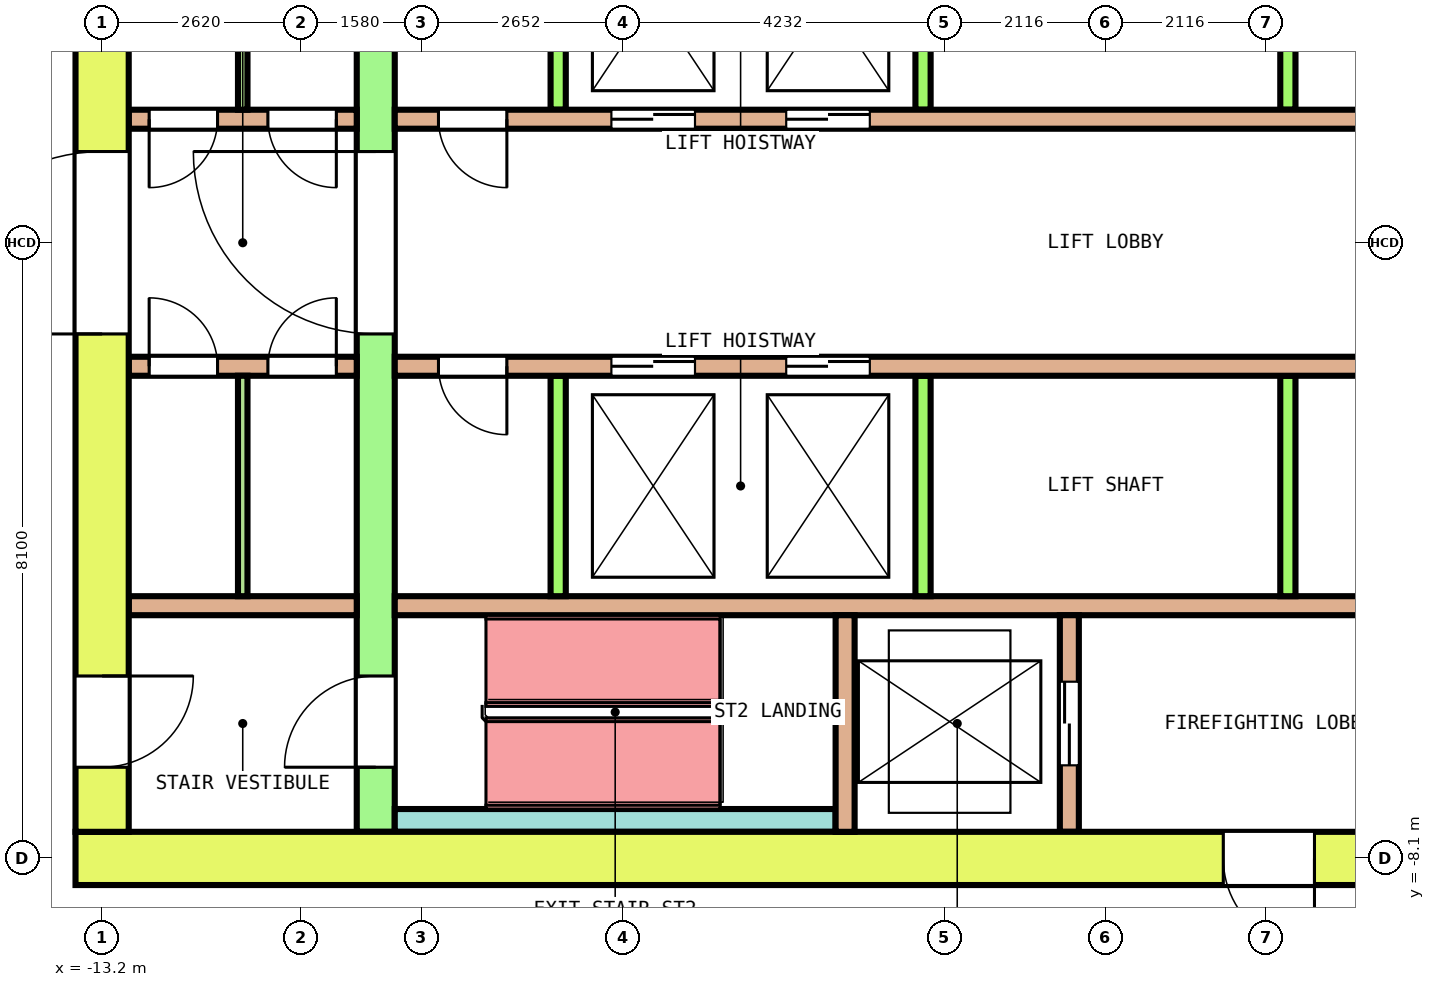
"""IFC4 building model, lengths in metres.
Left out: names, types, materials, properties, quantities, classifications, styles, units other than length and angle.
Written with IfcOpenShell. Run it as: python <this file> out.ifc"""

import sys

from ifc_helpers import new_model, si_unit, direction, frame, frame_2d, origin, place, context, subcontext, project, spatial, rectangle, extrude, element, fill, save


model = new_model("IFC4")
c1 = context("Model", 3, precision=1e-05, world=origin(), true_north=direction((0.0, 1.0)))
c2 = subcontext(c1, "Body", "Model", "MODEL_VIEW")
j1 = project(units=[si_unit("LENGTHUNIT", "METRE"), si_unit("PLANEANGLEUNIT", "RADIAN")], contexts=[c1])
p1 = place(None, origin())
s1 = spatial("IfcSite", under=j1, at=p1, CompositionType="ELEMENT")
p2 = place(p1, origin())
s2 = spatial("IfcBuilding", under=s1, at=p2, CompositionType="ELEMENT")
p3 = place(p2, frame((0.0, 0.0, 149.6)))
s3 = spatial("IfcBuildingStorey", under=s2, at=p3, CompositionType="ELEMENT", Elevation=149.6)
p4 = place(p3, frame((-13.55, -8.1, 0.0), z_axis=(0.0, 0.0, 1.0), x_axis=(1.0, 0.0, 0.0)))
e1 = element("IfcWall", 1, at=p4, inside=s3, PredefinedType="SHEAR", context=c2, shape_type="SweptSolid", body=[
    extrude(rectangle(XDim=27.1, YDim=0.7, at=frame_2d((13.55, 0.0))), origin(), (0.0, 0.0, 1.0), 4.1),
])
p5 = place(p4, frame((15.1, 0.0, 0.0)))
e2 = element("IfcOpeningElement", 2, at=p5, cuts=e1, PredefinedType="OPENING", context=c2, shape_type="SweptSolid", body=[
    extrude(rectangle(XDim=1.2, YDim=2.1, at=frame_2d((0.6, 1.05))), frame((0.0, 0.36, 0.0), z_axis=(0.0, -1.0, 0.0), x_axis=(1.0, 0.0, 0.0)), (0.0, 0.0, 1.0), 0.72),
])
p6 = place(p3, frame((-13.2, -7.75, 0.0), z_axis=(0.0, 0.0, 1.0), x_axis=(0.0, 1.0, 0.0)))
e3 = element("IfcWall", 3, at=p6, inside=s3, PredefinedType="SHEAR", context=c2, shape_type="SweptSolid", body=[
    extrude(rectangle(XDim=15.5, YDim=0.7, at=frame_2d((7.75, 0.0))), origin(), (0.0, 0.0, 1.0), 4.1),
])
p7 = place(p6, frame((6.55, 0.0, 0.0)))
e4 = element("IfcOpeningElement", 4, at=p7, cuts=e3, PredefinedType="OPENING", context=c2, shape_type="SweptSolid", body=[
    extrude(rectangle(XDim=2.4, YDim=2.1, at=frame_2d((1.2, 1.05))), frame((0.0, 0.36, 0.0), z_axis=(0.0, -1.0, 0.0), x_axis=(1.0, 0.0, 0.0)), (0.0, 0.0, 1.0), 0.72),
])
p8 = place(p6, frame((13.45, 0.0, 0.0)))
e5 = element("IfcOpeningElement", 5, at=p8, cuts=e3, PredefinedType="OPENING", context=c2, shape_type="SweptSolid", body=[
    extrude(rectangle(XDim=1.2, YDim=2.1, at=frame_2d((0.6, 1.05))), frame((0.0, 0.36, 0.0), z_axis=(0.0, -1.0, 0.0), x_axis=(1.0, 0.0, 0.0)), (0.0, 0.0, 1.0), 0.72),
])
p9 = place(p6, frame((0.85, 0.0, 0.0)))
e6 = element("IfcOpeningElement", 6, at=p9, cuts=e3, PredefinedType="OPENING", context=c2, shape_type="SweptSolid", body=[
    extrude(rectangle(XDim=1.2, YDim=2.1, at=frame_2d((0.6, 1.05))), frame((0.0, 0.36, 0.0), z_axis=(0.0, -1.0, 0.0), x_axis=(1.0, 0.0, 0.0)), (0.0, 0.0, 1.0), 0.72),
])
p10 = place(p3, frame((-9.6, -7.75, 0.0), z_axis=(0.0, 0.0, 1.0), x_axis=(0.0, 1.0, 0.0)))
e7 = element("IfcWall", 7, at=p10, inside=s3, PredefinedType="SHEAR", context=c2, shape_type="SweptSolid", body=[
    extrude(rectangle(XDim=15.5, YDim=0.5, at=frame_2d((7.75, 0.0))), origin(), (0.0, 0.0, 1.0), 4.1),
])
p11 = place(p10, frame((6.55, 0.0, 0.0)))
e8 = element("IfcOpeningElement", 8, at=p11, cuts=e7, PredefinedType="OPENING", context=c2, shape_type="SweptSolid", body=[
    extrude(rectangle(XDim=2.4, YDim=2.1, at=frame_2d((1.2, 1.05))), frame((0.0, 0.26, 0.0), z_axis=(0.0, -1.0, 0.0), x_axis=(1.0, 0.0, 0.0)), (0.0, 0.0, 1.0), 0.52),
])
p12 = place(p10, frame((13.45, 0.0, 0.0)))
e9 = element("IfcOpeningElement", 9, at=p12, cuts=e7, PredefinedType="OPENING", context=c2, shape_type="SweptSolid", body=[
    extrude(rectangle(XDim=1.2, YDim=2.1, at=frame_2d((0.6, 1.05))), frame((0.0, 0.26, 0.0), z_axis=(0.0, -1.0, 0.0), x_axis=(1.0, 0.0, 0.0)), (0.0, 0.0, 1.0), 0.52),
])
p13 = place(p10, frame((0.85, 0.0, 0.0)))
e10 = element("IfcOpeningElement", 10, at=p13, cuts=e7, PredefinedType="OPENING", context=c2, shape_type="SweptSolid", body=[
    extrude(rectangle(XDim=1.2, YDim=2.1, at=frame_2d((0.6, 1.05))), frame((0.0, 0.26, 0.0), z_axis=(0.0, -1.0, 0.0), x_axis=(1.0, 0.0, 0.0)), (0.0, 0.0, 1.0), 0.52),
])
p14 = place(p3, frame((-12.85, 1.625, 0.0), z_axis=(0.0, 0.0, 1.0), x_axis=(1.0, 0.0, 0.0)))
e11 = element("IfcWall", 11, at=p14, inside=s3, PredefinedType="SOLIDWALL", context=c2, shape_type="SweptSolid", body=[
    extrude(rectangle(XDim=3.0, YDim=0.25, at=frame_2d((1.5, 0.0))), origin(), (0.0, 0.0, 1.0), 4.1),
])
p15 = place(p14, frame((0.269, 0.0, 0.0)))
e12 = element("IfcOpeningElement", 12, at=p15, cuts=e11, PredefinedType="OPENING", context=c2, shape_type="SweptSolid", body=[
    extrude(rectangle(XDim=0.9, YDim=2.1, at=frame_2d((0.45, 1.05))), frame((0.0, 0.135, 0.0), z_axis=(0.0, -1.0, 0.0), x_axis=(1.0, 0.0, 0.0)), (0.0, 0.0, 1.0), 0.27),
])
p16 = place(p14, frame((1.831, 0.0, 0.0)))
e13 = element("IfcOpeningElement", 13, at=p16, cuts=e11, PredefinedType="OPENING", context=c2, shape_type="SweptSolid", body=[
    extrude(rectangle(XDim=0.9, YDim=2.1, at=frame_2d((0.45, 1.05))), frame((0.0, 0.135, 0.0), z_axis=(0.0, -1.0, 0.0), x_axis=(1.0, 0.0, 0.0)), (0.0, 0.0, 1.0), 0.27),
])
p17 = place(p3, frame((-9.35, 1.625, 0.0), z_axis=(0.0, 0.0, 1.0), x_axis=(1.0, 0.0, 0.0)))
e14 = element("IfcWall", 14, at=p17, inside=s3, PredefinedType="SOLIDWALL", context=c2, shape_type="SweptSolid", body=[
    extrude(rectangle(XDim=18.7, YDim=0.25, at=frame_2d((9.35, 0.0))), origin(), (0.0, 0.0, 1.0), 4.1),
])
p18 = place(p17, frame((2.85, 0.0, 0.0)))
e15 = element("IfcOpeningElement", 15, at=p18, cuts=e14, PredefinedType="OPENING", context=c2, shape_type="SweptSolid", body=[
    extrude(rectangle(XDim=1.1, YDim=2.1, at=frame_2d((0.55, 1.05))), frame((0.0, 0.135, 0.0), z_axis=(0.0, -1.0, 0.0), x_axis=(1.0, 0.0, 0.0)), (0.0, 0.0, 1.0), 0.27),
])
p19 = place(p17, frame((5.15, 0.0, 0.0)))
e16 = element("IfcOpeningElement", 16, at=p19, cuts=e14, PredefinedType="OPENING", context=c2, shape_type="SweptSolid", body=[
    extrude(rectangle(XDim=1.1, YDim=2.1, at=frame_2d((0.55, 1.05))), frame((0.0, 0.135, 0.0), z_axis=(0.0, -1.0, 0.0), x_axis=(1.0, 0.0, 0.0)), (0.0, 0.0, 1.0), 0.27),
])
p20 = place(p17, frame((14.8, 0.0, 0.0)))
e17 = element("IfcOpeningElement", 17, at=p20, cuts=e14, PredefinedType="OPENING", context=c2, shape_type="SweptSolid", body=[
    extrude(rectangle(XDim=1.1, YDim=2.1, at=frame_2d((0.55, 1.05))), frame((0.0, 0.135, 0.0), z_axis=(0.0, -1.0, 0.0), x_axis=(1.0, 0.0, 0.0)), (0.0, 0.0, 1.0), 0.27),
])
p21 = place(p17, frame((0.575, 0.0, 0.0)))
e18 = element("IfcOpeningElement", 18, at=p21, cuts=e14, PredefinedType="OPENING", context=c2, shape_type="SweptSolid", body=[
    extrude(rectangle(XDim=0.9, YDim=2.1, at=frame_2d((0.45, 1.05))), frame((0.0, 0.135, 0.0), z_axis=(0.0, -1.0, 0.0), x_axis=(1.0, 0.0, 0.0)), (0.0, 0.0, 1.0), 0.27),
])
p22 = place(p17, frame((17.225, 0.0, 0.0)))
e19 = element("IfcOpeningElement", 19, at=p22, cuts=e14, PredefinedType="OPENING", context=c2, shape_type="SweptSolid", body=[
    extrude(rectangle(XDim=0.9, YDim=2.1, at=frame_2d((0.45, 1.05))), frame((0.0, 0.135, 0.0), z_axis=(0.0, -1.0, 0.0), x_axis=(1.0, 0.0, 0.0)), (0.0, 0.0, 1.0), 0.27),
])
for number, where, z_axis, x_axis in (
    (20, (-7.2, 1.75, 0.0), (0.0, 0.0, 1.0), (0.0, 1.0, 0.0)),
    (21, (-2.4, 1.75, 0.0), (0.0, 0.0, 1.0), (0.0, 1.0, 0.0)),
    (22, (2.4, 1.75, 0.0), (0.0, 0.0, 1.0), (0.0, 1.0, 0.0)),
):
    element("IfcWall", number, at=place(p3, frame(where, z_axis=z_axis, x_axis=x_axis)), inside=s3, PredefinedType="SOLIDWALL", context=c2, shape_type="SweptSolid", body=[
        extrude(rectangle(XDim=2.9, YDim=0.2, at=frame_2d((1.45, 0.0))), origin(), (0.0, 0.0, 1.0), 4.1),
    ])
p23 = place(p3, frame((-12.85, -1.625, 0.0), z_axis=(0.0, 0.0, 1.0), x_axis=(1.0, 0.0, 0.0)))
e23 = element("IfcWall", 23, at=p23, inside=s3, PredefinedType="SOLIDWALL", context=c2, shape_type="SweptSolid", body=[
    extrude(rectangle(XDim=3.0, YDim=0.25, at=frame_2d((1.5, 0.0))), origin(), (0.0, 0.0, 1.0), 4.1),
])
p24 = place(p23, frame((0.269, 0.0, 0.0)))
e24 = element("IfcOpeningElement", 24, at=p24, cuts=e23, PredefinedType="OPENING", context=c2, shape_type="SweptSolid", body=[
    extrude(rectangle(XDim=0.9, YDim=2.1, at=frame_2d((0.45, 1.05))), frame((0.0, 0.135, 0.0), z_axis=(0.0, -1.0, 0.0), x_axis=(1.0, 0.0, 0.0)), (0.0, 0.0, 1.0), 0.27),
])
p25 = place(p23, frame((1.831, 0.0, 0.0)))
e25 = element("IfcOpeningElement", 25, at=p25, cuts=e23, PredefinedType="OPENING", context=c2, shape_type="SweptSolid", body=[
    extrude(rectangle(XDim=0.9, YDim=2.1, at=frame_2d((0.45, 1.05))), frame((0.0, 0.135, 0.0), z_axis=(0.0, -1.0, 0.0), x_axis=(1.0, 0.0, 0.0)), (0.0, 0.0, 1.0), 0.27),
])
p26 = place(p3, frame((-9.35, -1.625, 0.0), z_axis=(0.0, 0.0, 1.0), x_axis=(1.0, 0.0, 0.0)))
e26 = element("IfcWall", 26, at=p26, inside=s3, PredefinedType="SOLIDWALL", context=c2, shape_type="SweptSolid", body=[
    extrude(rectangle(XDim=18.7, YDim=0.25, at=frame_2d((9.35, 0.0))), origin(), (0.0, 0.0, 1.0), 4.1),
])
p27 = place(p26, frame((2.85, 0.0, 0.0)))
e27 = element("IfcOpeningElement", 27, at=p27, cuts=e26, PredefinedType="OPENING", context=c2, shape_type="SweptSolid", body=[
    extrude(rectangle(XDim=1.1, YDim=2.1, at=frame_2d((0.55, 1.05))), frame((0.0, 0.135, 0.0), z_axis=(0.0, -1.0, 0.0), x_axis=(1.0, 0.0, 0.0)), (0.0, 0.0, 1.0), 0.27),
])
p28 = place(p26, frame((5.15, 0.0, 0.0)))
e28 = element("IfcOpeningElement", 28, at=p28, cuts=e26, PredefinedType="OPENING", context=c2, shape_type="SweptSolid", body=[
    extrude(rectangle(XDim=1.1, YDim=2.1, at=frame_2d((0.55, 1.05))), frame((0.0, 0.135, 0.0), z_axis=(0.0, -1.0, 0.0), x_axis=(1.0, 0.0, 0.0)), (0.0, 0.0, 1.0), 0.27),
])
p29 = place(p26, frame((14.8, 0.0, 0.0)))
e29 = element("IfcOpeningElement", 29, at=p29, cuts=e26, PredefinedType="OPENING", context=c2, shape_type="SweptSolid", body=[
    extrude(rectangle(XDim=1.1, YDim=2.1, at=frame_2d((0.55, 1.05))), frame((0.0, 0.135, 0.0), z_axis=(0.0, -1.0, 0.0), x_axis=(1.0, 0.0, 0.0)), (0.0, 0.0, 1.0), 0.27),
])
p30 = place(p26, frame((0.575, 0.0, 0.0)))
e30 = element("IfcOpeningElement", 30, at=p30, cuts=e26, PredefinedType="OPENING", context=c2, shape_type="SweptSolid", body=[
    extrude(rectangle(XDim=0.9, YDim=2.1, at=frame_2d((0.45, 1.05))), frame((0.0, 0.135, 0.0), z_axis=(0.0, -1.0, 0.0), x_axis=(1.0, 0.0, 0.0)), (0.0, 0.0, 1.0), 0.27),
])
p31 = place(p26, frame((17.225, 0.0, 0.0)))
e31 = element("IfcOpeningElement", 31, at=p31, cuts=e26, PredefinedType="OPENING", context=c2, shape_type="SweptSolid", body=[
    extrude(rectangle(XDim=0.9, YDim=2.1, at=frame_2d((0.45, 1.05))), frame((0.0, 0.135, 0.0), z_axis=(0.0, -1.0, 0.0), x_axis=(1.0, 0.0, 0.0)), (0.0, 0.0, 1.0), 0.27),
])
p32 = place(p3, frame((-12.85, -4.775, 0.0), z_axis=(0.0, 0.0, 1.0), x_axis=(1.0, 0.0, 0.0)))
e32 = element("IfcWall", 32, at=p32, inside=s3, PredefinedType="SOLIDWALL", context=c2, shape_type="SweptSolid", body=[
    extrude(rectangle(XDim=3.0, YDim=0.25, at=frame_2d((1.5, 0.0))), origin(), (0.0, 0.0, 1.0), 4.1),
])
p33 = place(p3, frame((-9.35, -4.775, 0.0), z_axis=(0.0, 0.0, 1.0), x_axis=(1.0, 0.0, 0.0)))
e33 = element("IfcWall", 33, at=p33, inside=s3, PredefinedType="SOLIDWALL", context=c2, shape_type="SweptSolid", body=[
    extrude(rectangle(XDim=18.7, YDim=0.25, at=frame_2d((9.35, 0.0))), origin(), (0.0, 0.0, 1.0), 4.1),
])
for number, where, z_axis, x_axis in (
    (34, (-7.2, -4.65, 0.0), (0.0, 0.0, 1.0), (0.0, 1.0, 0.0)),
    (35, (-2.4, -4.65, 0.0), (0.0, 0.0, 1.0), (0.0, 1.0, 0.0)),
    (36, (2.4, -4.65, 0.0), (0.0, 0.0, 1.0), (0.0, 1.0, 0.0)),
):
    element("IfcWall", number, at=place(p3, frame(where, z_axis=z_axis, x_axis=x_axis)), inside=s3, PredefinedType="SOLIDWALL", context=c2, shape_type="SweptSolid", body=[
        extrude(rectangle(XDim=2.9, YDim=0.2, at=frame_2d((1.45, 0.0))), origin(), (0.0, 0.0, 1.0), 4.1),
    ])
p34 = place(p3, frame((-9.35, -7.6, 0.0), z_axis=(0.0, 0.0, 1.0), x_axis=(1.0, 0.0, 0.0)))
e37 = element("IfcWall", 37, at=p34, inside=s3, PredefinedType="SOLIDWALL", context=c2, shape_type="SweptSolid", body=[
    extrude(rectangle(XDim=5.8, YDim=0.3, at=frame_2d((2.9, 0.0))), origin(), (0.0, 0.0, 1.0), 4.1),
])
p35 = place(p3, frame((-3.425, -7.75, 0.0), z_axis=(0.0, 0.0, 1.0), x_axis=(0.0, 1.0, 0.0)))
e38 = element("IfcWall", 38, at=p35, inside=s3, PredefinedType="SOLIDWALL", context=c2, shape_type="SweptSolid", body=[
    extrude(rectangle(XDim=2.85, YDim=0.25, at=frame_2d((1.425, 0.0))), origin(), (0.0, 0.0, 1.0), 4.1),
])
p36 = place(p3, frame((-0.475, -7.75, 0.0), z_axis=(0.0, 0.0, 1.0), x_axis=(0.0, 1.0, 0.0)))
e39 = element("IfcWall", 39, at=p36, inside=s3, PredefinedType="SOLIDWALL", context=c2, shape_type="SweptSolid", body=[
    extrude(rectangle(XDim=2.85, YDim=0.25, at=frame_2d((1.425, 0.0))), origin(), (0.0, 0.0, 1.0), 4.1),
])
p37 = place(p36, frame((0.875, 0.0, 0.0)))
e40 = element("IfcOpeningElement", 40, at=p37, cuts=e39, PredefinedType="OPENING", context=c2, shape_type="SweptSolid", body=[
    extrude(rectangle(XDim=1.1, YDim=2.1, at=frame_2d((0.55, 1.05))), frame((0.0, 0.135, 0.0), z_axis=(0.0, -1.0, 0.0), x_axis=(1.0, 0.0, 0.0)), (0.0, 0.0, 1.0), 0.27),
])
for number, where, z_axis, x_axis in (
    (41, (-11.35, 1.75, 0.0), (0.0, 0.0, 1.0), (0.0, 1.0, 0.0)),
    (42, (-11.35, -4.65, 0.0), (0.0, 0.0, 1.0), (0.0, 1.0, 0.0)),
):
    element("IfcWall", number, at=place(p3, frame(where, z_axis=z_axis, x_axis=x_axis)), inside=s3, PredefinedType="PARTITIONING", context=c2, shape_type="SweptSolid", body=[
        extrude(rectangle(XDim=2.9, YDim=0.125, at=frame_2d((1.45, 0.0))), origin(), (0.0, 0.0, 1.0), 4.1),
    ])
p38 = place(p18, origin())
e43 = element("IfcDoor", 43, at=p38, inside=s3, OperationType="DOUBLE_DOOR_SLIDING", PredefinedType="DOOR", context=c2, shape_type="SweptSolid", body=[
    extrude(rectangle(XDim=1.1, YDim=2.1, at=frame_2d((0.55, 1.05))), frame((0.0, 0.075, 0.0), z_axis=(0.0, -1.0, 0.0), x_axis=(1.0, 0.0, 0.0)), (0.0, 0.0, 1.0), 0.15),
])
fill(e15, e43)
p39 = place(p19, origin())
e44 = element("IfcDoor", 44, at=p39, inside=s3, OperationType="DOUBLE_DOOR_SLIDING", PredefinedType="DOOR", context=c2, shape_type="SweptSolid", body=[
    extrude(rectangle(XDim=1.1, YDim=2.1, at=frame_2d((0.55, 1.05))), frame((0.0, 0.075, 0.0), z_axis=(0.0, -1.0, 0.0), x_axis=(1.0, 0.0, 0.0)), (0.0, 0.0, 1.0), 0.15),
])
fill(e16, e44)
p40 = place(p27, origin())
e45 = element("IfcDoor", 45, at=p40, inside=s3, OperationType="DOUBLE_DOOR_SLIDING", PredefinedType="DOOR", context=c2, shape_type="SweptSolid", body=[
    extrude(rectangle(XDim=1.1, YDim=2.1, at=frame_2d((0.55, 1.05))), frame((0.0, 0.075, 0.0), z_axis=(0.0, -1.0, 0.0), x_axis=(1.0, 0.0, 0.0)), (0.0, 0.0, 1.0), 0.15),
])
fill(e27, e45)
p41 = place(p28, origin())
e46 = element("IfcDoor", 46, at=p41, inside=s3, OperationType="DOUBLE_DOOR_SLIDING", PredefinedType="DOOR", context=c2, shape_type="SweptSolid", body=[
    extrude(rectangle(XDim=1.1, YDim=2.1, at=frame_2d((0.55, 1.05))), frame((0.0, 0.075, 0.0), z_axis=(0.0, -1.0, 0.0), x_axis=(1.0, 0.0, 0.0)), (0.0, 0.0, 1.0), 0.15),
])
fill(e28, e46)
p42 = place(p37, origin())
e47 = element("IfcDoor", 47, at=p42, inside=s3, OperationType="DOUBLE_DOOR_SLIDING", PredefinedType="DOOR", context=c2, shape_type="SweptSolid", body=[
    extrude(rectangle(XDim=1.1, YDim=2.1, at=frame_2d((0.55, 1.05))), frame((0.0, 0.075, 0.0), z_axis=(0.0, -1.0, 0.0), x_axis=(1.0, 0.0, 0.0)), (0.0, 0.0, 1.0), 0.15),
])
fill(e40, e47)
p43 = place(p11, origin())
e48 = element("IfcDoor", 48, at=p43, inside=s3, OperationType="DOUBLE_DOOR_SINGLE_SWING", PredefinedType="DOOR", context=c2, shape_type="SweptSolid", body=[
    extrude(rectangle(XDim=2.4, YDim=2.1, at=frame_2d((1.2, 1.05))), frame((0.0, 0.2, 0.0), z_axis=(0.0, -1.0, 0.0), x_axis=(1.0, 0.0, 0.0)), (0.0, 0.0, 1.0), 0.4),
])
fill(e8, e48)
p44 = place(p7, origin())
e49 = element("IfcDoor", 49, at=p44, inside=s3, OperationType="DOUBLE_DOOR_SINGLE_SWING", PredefinedType="DOOR", context=c2, shape_type="SweptSolid", body=[
    extrude(rectangle(XDim=2.4, YDim=2.1, at=frame_2d((1.2, 1.05))), frame((0.0, 0.3, 0.0), z_axis=(0.0, -1.0, 0.0), x_axis=(1.0, 0.0, 0.0)), (0.0, 0.0, 1.0), 0.6),
])
fill(e4, e49)
p45 = place(p13, origin())
e50 = element("IfcDoor", 50, at=p45, inside=s3, OperationType="SINGLE_SWING_LEFT", PredefinedType="DOOR", context=c2, shape_type="SweptSolid", body=[
    extrude(rectangle(XDim=1.2, YDim=2.1, at=frame_2d((0.6, 1.05))), frame((0.0, 0.2, 0.0), z_axis=(0.0, -1.0, 0.0), x_axis=(1.0, 0.0, 0.0)), (0.0, 0.0, 1.0), 0.4),
])
fill(e10, e50)
p46 = place(p9, origin())
e51 = element("IfcDoor", 51, at=p46, inside=s3, OperationType="SINGLE_SWING_RIGHT", PredefinedType="DOOR", context=c2, shape_type="SweptSolid", body=[
    extrude(rectangle(XDim=1.2, YDim=2.1, at=frame_2d((0.6, 1.05))), frame((0.0, 0.3, 0.0), z_axis=(0.0, -1.0, 0.0), x_axis=(1.0, 0.0, 0.0)), (0.0, 0.0, 1.0), 0.6),
])
fill(e6, e51)
p47 = place(p5, origin())
e52 = element("IfcDoor", 52, at=p47, inside=s3, OperationType="SINGLE_SWING_LEFT", PredefinedType="DOOR", context=c2, shape_type="SweptSolid", body=[
    extrude(rectangle(XDim=1.2, YDim=2.1, at=frame_2d((0.6, 1.05))), frame((0.0, 0.3, 0.0), z_axis=(0.0, -1.0, 0.0), x_axis=(1.0, 0.0, 0.0)), (0.0, 0.0, 1.0), 0.6),
])
fill(e2, e52)
p48 = place(p15, origin())
e53 = element("IfcDoor", 53, at=p48, inside=s3, OperationType="SINGLE_SWING_RIGHT", PredefinedType="DOOR", context=c2, shape_type="SweptSolid", body=[
    extrude(rectangle(XDim=0.9, YDim=2.1, at=frame_2d((0.45, 1.05))), frame((0.0, 0.075, 0.0), z_axis=(0.0, -1.0, 0.0), x_axis=(1.0, 0.0, 0.0)), (0.0, 0.0, 1.0), 0.15),
])
fill(e12, e53)
p49 = place(p16, origin())
e54 = element("IfcDoor", 54, at=p49, inside=s3, OperationType="SINGLE_SWING_LEFT", PredefinedType="DOOR", context=c2, shape_type="SweptSolid", body=[
    extrude(rectangle(XDim=0.9, YDim=2.1, at=frame_2d((0.45, 1.05))), frame((0.0, 0.075, 0.0), z_axis=(0.0, -1.0, 0.0), x_axis=(1.0, 0.0, 0.0)), (0.0, 0.0, 1.0), 0.15),
])
fill(e13, e54)
p50 = place(p21, origin())
e55 = element("IfcDoor", 55, at=p50, inside=s3, OperationType="SINGLE_SWING_RIGHT", PredefinedType="DOOR", context=c2, shape_type="SweptSolid", body=[
    extrude(rectangle(XDim=0.9, YDim=2.1, at=frame_2d((0.45, 1.05))), frame((0.0, 0.075, 0.0), z_axis=(0.0, -1.0, 0.0), x_axis=(1.0, 0.0, 0.0)), (0.0, 0.0, 1.0), 0.15),
])
fill(e18, e55)
p51 = place(p24, origin())
e56 = element("IfcDoor", 56, at=p51, inside=s3, OperationType="SINGLE_SWING_LEFT", PredefinedType="DOOR", context=c2, shape_type="SweptSolid", body=[
    extrude(rectangle(XDim=0.9, YDim=2.1, at=frame_2d((0.45, 1.05))), frame((0.0, 0.075, 0.0), z_axis=(0.0, -1.0, 0.0), x_axis=(1.0, 0.0, 0.0)), (0.0, 0.0, 1.0), 0.15),
])
fill(e24, e56)
p52 = place(p25, origin())
e57 = element("IfcDoor", 57, at=p52, inside=s3, OperationType="SINGLE_SWING_RIGHT", PredefinedType="DOOR", context=c2, shape_type="SweptSolid", body=[
    extrude(rectangle(XDim=0.9, YDim=2.1, at=frame_2d((0.45, 1.05))), frame((0.0, 0.075, 0.0), z_axis=(0.0, -1.0, 0.0), x_axis=(1.0, 0.0, 0.0)), (0.0, 0.0, 1.0), 0.15),
])
fill(e25, e57)
p53 = place(p30, origin())
e58 = element("IfcDoor", 58, at=p53, inside=s3, OperationType="SINGLE_SWING_LEFT", PredefinedType="DOOR", context=c2, shape_type="SweptSolid", body=[
    extrude(rectangle(XDim=0.9, YDim=2.1, at=frame_2d((0.45, 1.05))), frame((0.0, 0.075, 0.0), z_axis=(0.0, -1.0, 0.0), x_axis=(1.0, 0.0, 0.0)), (0.0, 0.0, 1.0), 0.15),
])
fill(e30, e58)
save(model, sys.argv[1])
